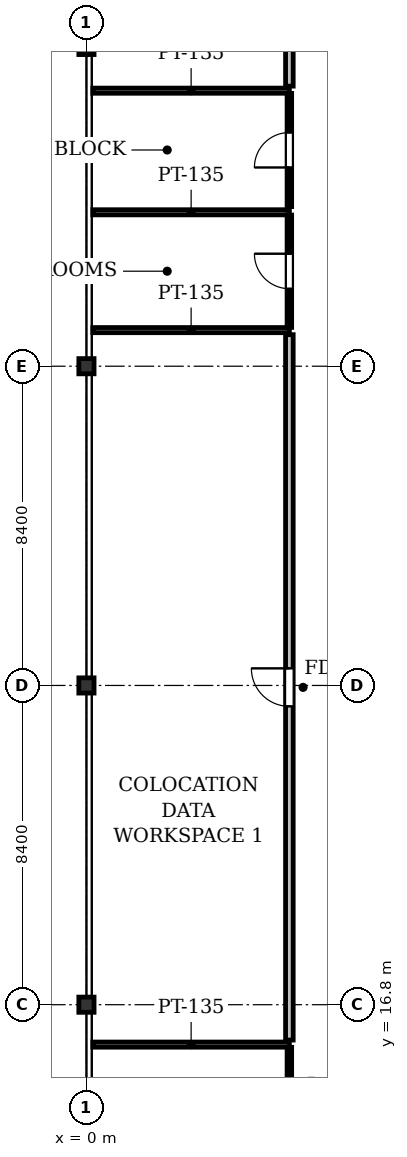
"""IFC4 building model, lengths in metres.
Left out: names, types, materials, properties, quantities, classifications, styles, units other than length and angle.
Written with IfcOpenShell. Run it as: python <this file> out.ifc"""

import sys

from ifc_helpers import new_model, si_unit, direction, frame, frame_2d, origin, origin_2d, place, context, subcontext, project, spatial, rectangle, i_section, extrude, element, fill, save


model = new_model("IFC4")
c1 = context("Model", 3, precision=1e-05, world=origin(), true_north=direction((0.0, 1.0)))
c2 = subcontext(c1, "Body", "Model", "MODEL_VIEW")
j1 = project(units=[si_unit("LENGTHUNIT", "METRE"), si_unit("PLANEANGLEUNIT", "RADIAN")], contexts=[c1])
p1 = place(None, origin())
s1 = spatial("IfcSite", under=j1, at=p1, CompositionType="ELEMENT")
p2 = place(p1, origin())
s2 = spatial("IfcBuilding", under=s1, at=p2, CompositionType="ELEMENT")
p3 = place(p2, frame((0.0, 0.0, 96.7)))
s3 = spatial("IfcBuildingStorey", under=s2, at=p3, CompositionType="ELEMENT", Elevation=96.7)
for number, where, z_axis, x_axis in (
    (1, (0.0, 16.8, 0.0), (0.0, 0.0, 1.0), (1.0, 0.0, 0.0)),
    (2, (0.0, 25.2, 0.0), (0.0, 0.0, 1.0), (1.0, 0.0, 0.0)),
    (3, (0.0, 33.6, 0.0), (0.0, 0.0, 1.0), (1.0, 0.0, 0.0)),
    (4, (0.0, 42.0, 0.0), (0.0, 0.0, 1.0), (1.0, 0.0, 0.0)),
):
    element("IfcColumn", number, at=place(p3, frame(where, z_axis=z_axis, x_axis=x_axis)), inside=s3, PredefinedType="COLUMN", context=c2, shape_type="SweptSolid", body=[
        extrude(i_section(OverallWidth=0.4, OverallDepth=0.4, WebThickness=0.025, FlangeThickness=0.04, at=origin_2d()), origin(), (0.0, 0.0, 1.0), 4.1),
    ])
p4 = place(p3, frame((5.34, 15.75, 0.0), z_axis=(0.0, 0.0, 1.0), x_axis=(-1.0, 0.0, 0.0)))
e5 = element("IfcWall", 5, at=p4, inside=s3, PredefinedType="PARTITIONING", context=c2, shape_type="SweptSolid", body=[
    extrude(rectangle(XDim=5.171, YDim=0.135, at=frame_2d((2.585, 0.0))), origin(), (0.0, 0.0, 1.0), 3.469),
])
p5 = place(p3, frame((5.34, 12.671, 0.0), z_axis=(0.0, 0.0, 1.0), x_axis=(0.0, 1.0, 0.0)))
e6 = element("IfcWall", 6, at=p5, inside=s3, PredefinedType="PARTITIONING", context=c2, shape_type="SweptSolid", body=[
    extrude(rectangle(XDim=3.007, YDim=0.12, at=frame_2d((1.503, 0.0))), origin(), (0.0, 0.0, 1.0), 3.825),
])
p6 = place(p5, frame((1.043, 0.0, 0.0)))
e7 = element("IfcOpeningElement", 7, at=p6, cuts=e6, PredefinedType="OPENING", context=c2, shape_type="SweptSolid", body=[
    extrude(rectangle(XDim=0.92, YDim=2.1, at=frame_2d((0.46, 1.05))), frame((0.0, 0.07, 0.0), z_axis=(0.0, -1.0, 0.0), x_axis=(1.0, 0.0, 0.0)), (0.0, 0.0, 1.0), 0.14),
])
for number, where, z_axis, x_axis in (
    (8, (5.34, 37.65, 0.0), (0.0, 0.0, 1.0), (-1.0, 0.0, 0.0)),
    (9, (0.169, 34.55, 0.0), (0.0, 0.0, 1.0), (1.0, 0.0, 0.0)),
):
    element("IfcWall", number, at=place(p3, frame(where, z_axis=z_axis, x_axis=x_axis)), inside=s3, PredefinedType="PARTITIONING", context=c2, shape_type="SweptSolid", body=[
        extrude(rectangle(XDim=5.171, YDim=0.135, at=frame_2d((2.585, 0.0))), origin(), (0.0, 0.0, 1.0), 3.469),
    ])
p7 = place(p3, frame((5.34, 34.622, 0.0), z_axis=(0.0, 0.0, 1.0), x_axis=(0.0, 1.0, 0.0)))
e10 = element("IfcWall", 10, at=p7, inside=s3, PredefinedType="PARTITIONING", context=c2, shape_type="SweptSolid", body=[
    extrude(rectangle(XDim=2.957, YDim=0.12, at=frame_2d((1.479, 0.0))), origin(), (0.0, 0.0, 1.0), 3.825),
])
p8 = place(p7, frame((1.019, 0.0, 0.0)))
e11 = element("IfcOpeningElement", 11, at=p8, cuts=e10, PredefinedType="OPENING", context=c2, shape_type="SweptSolid", body=[
    extrude(rectangle(XDim=0.92, YDim=2.1, at=frame_2d((0.46, 1.05))), frame((0.0, 0.07, 0.0), z_axis=(0.0, -1.0, 0.0), x_axis=(1.0, 0.0, 0.0)), (0.0, 0.0, 1.0), 0.14),
])
p9 = place(p3, frame((5.34, 40.85, 0.0), z_axis=(0.0, 0.0, 1.0), x_axis=(-1.0, 0.0, 0.0)))
e12 = element("IfcWall", 12, at=p9, inside=s3, PredefinedType="PARTITIONING", context=c2, shape_type="SweptSolid", body=[
    extrude(rectangle(XDim=5.171, YDim=0.135, at=frame_2d((2.585, 0.0))), origin(), (0.0, 0.0, 1.0), 3.469),
])
p10 = place(p3, frame((5.34, 37.8, 0.0), z_axis=(0.0, 0.0, 1.0), x_axis=(0.0, 1.0, 0.0)))
e13 = element("IfcWall", 13, at=p10, inside=s3, PredefinedType="PARTITIONING", context=c2, shape_type="SweptSolid", body=[
    extrude(rectangle(XDim=2.979, YDim=0.12, at=frame_2d((1.489, 0.0))), origin(), (0.0, 0.0, 1.0), 3.825),
])
p11 = place(p10, frame((1.029, 0.0, 0.0)))
e14 = element("IfcOpeningElement", 14, at=p11, cuts=e13, PredefinedType="OPENING", context=c2, shape_type="SweptSolid", body=[
    extrude(rectangle(XDim=0.92, YDim=2.1, at=frame_2d((0.46, 1.05))), frame((0.0, 0.07, 0.0), z_axis=(0.0, -1.0, 0.0), x_axis=(1.0, 0.0, 0.0)), (0.0, 0.0, 1.0), 0.14),
])
p12 = place(p3, frame((5.34, 15.87, 0.0), z_axis=(0.0, 0.0, 1.0), x_axis=(0.0, 1.0, 0.0)))
e15 = element("IfcWall", 15, at=p12, inside=s3, PredefinedType="PARTITIONING", context=c2, shape_type="SweptSolid", body=[
    extrude(rectangle(XDim=18.56, YDim=0.2, at=frame_2d((9.28, 0.0))), origin(), (0.0, 0.0, 1.0), 3.292),
])
p13 = place(p12, frame((8.78, 0.0, 0.0)))
e16 = element("IfcOpeningElement", 16, at=p13, cuts=e15, PredefinedType="OPENING", context=c2, shape_type="SweptSolid", body=[
    extrude(rectangle(XDim=1.0, YDim=2.15, at=frame_2d((0.5, 1.075))), frame((0.0, 0.11, 0.0), z_axis=(0.0, -1.0, 0.0), x_axis=(1.0, 0.0, 0.0)), (0.0, 0.0, 1.0), 0.22),
])
p14 = place(p3, frame((5.34, 40.97, 0.0), z_axis=(0.0, 0.0, 1.0), x_axis=(0.0, 1.0, 0.0)))
e17 = element("IfcWall", 17, at=p14, inside=s3, PredefinedType="PARTITIONING", context=c2, shape_type="SweptSolid", body=[
    extrude(rectangle(XDim=2.03, YDim=0.2, at=frame_2d((1.015, 0.0))), origin(), (0.0, 0.0, 1.0), 3.292),
])
p15 = place(p8, origin())
e18 = element("IfcDoor", 18, at=p15, inside=s3, OperationType="SINGLE_SWING_RIGHT", PredefinedType="DOOR", context=c2, shape_type="SweptSolid", body=[
    extrude(rectangle(XDim=0.92, YDim=2.1, at=frame_2d((0.46, 1.05))), frame((0.0, 0.025, 0.0), z_axis=(0.0, -1.0, 0.0), x_axis=(1.0, 0.0, 0.0)), (0.0, 0.0, 1.0), 0.05),
])
fill(e11, e18)
p16 = place(p11, origin())
e19 = element("IfcDoor", 19, at=p16, inside=s3, OperationType="SINGLE_SWING_LEFT", PredefinedType="DOOR", context=c2, shape_type="SweptSolid", body=[
    extrude(rectangle(XDim=0.92, YDim=2.1, at=frame_2d((0.46, 1.05))), frame((0.0, 0.025, 0.0), z_axis=(0.0, -1.0, 0.0), x_axis=(1.0, 0.0, 0.0)), (0.0, 0.0, 1.0), 0.05),
])
fill(e14, e19)
p17 = place(p13, origin())
e20 = element("IfcDoor", 20, at=p17, inside=s3, OperationType="SINGLE_SWING_RIGHT", PredefinedType="DOOR", context=c2, shape_type="SweptSolid", body=[
    extrude(rectangle(XDim=1.0, YDim=2.15, at=frame_2d((0.5, 1.075))), frame((0.0, 0.025, 0.0), z_axis=(0.0, -1.0, 0.0), x_axis=(1.0, 0.0, 0.0)), (0.0, 0.0, 1.0), 0.05),
])
fill(e16, e20)
save(model, sys.argv[1])
